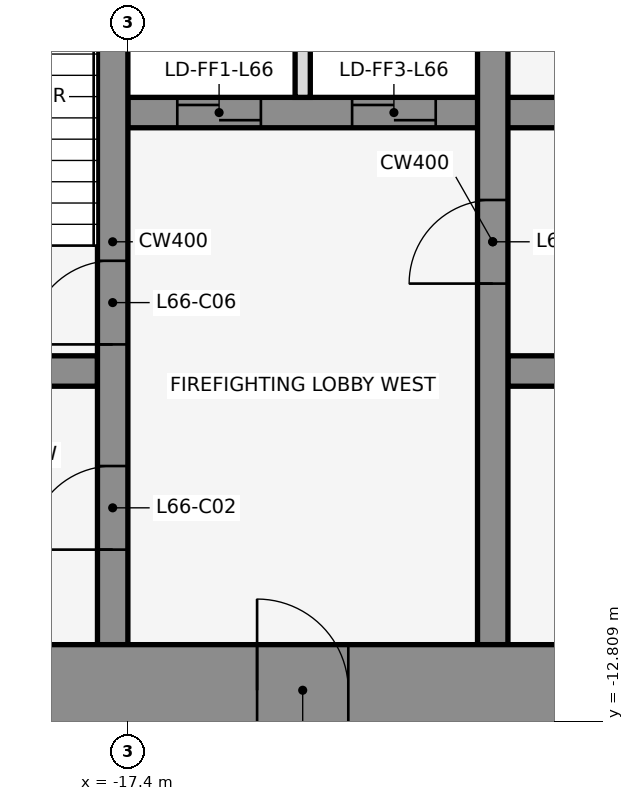
"""IFC4 building model, lengths in metres.
Left out: names, types, materials, properties, quantities, classifications, styles, units other than length and angle.
Written with IfcOpenShell. Run it as: python <this file> out.ifc"""

import sys

from ifc_helpers import new_model, si_unit, direction, frame, frame_2d, origin, place, context, subcontext, project, spatial, rectangle, extrude, element, fill, save


model = new_model("IFC4")
c1 = context("Model", 3, precision=1e-05, world=origin(), true_north=direction((0.0, 1.0)))
c2 = subcontext(c1, "Body", "Model", "MODEL_VIEW")
j1 = project(units=[si_unit("LENGTHUNIT", "METRE"), si_unit("PLANEANGLEUNIT", "RADIAN")], contexts=[c1])
p1 = place(None, origin())
s1 = spatial("IfcSite", under=j1, at=p1, CompositionType="ELEMENT")
p2 = place(p1, origin())
s2 = spatial("IfcBuilding", under=s1, at=p2, CompositionType="ELEMENT")
p3 = place(p2, frame((0.0, 0.0, 293.0)))
s3 = spatial("IfcBuildingStorey", under=s2, at=p3, CompositionType="ELEMENT", Elevation=293.0)
p4 = place(p3, frame((-20.8, -8.2, 0.0), z_axis=(0.0, 0.0, 1.0), x_axis=(1.0, 0.0, 0.0)))
e1 = element("IfcWall", 1, at=p4, inside=s3, PredefinedType="SHEAR", context=c2, shape_type="SweptSolid", body=[
    extrude(rectangle(XDim=3.0, YDim=0.4, at=frame_2d((1.5, 0.0))), origin(), (0.0, 0.0, 1.0), 4.5),
])
p5 = place(p4, frame((0.85, 0.0, 0.0)))
e2 = element("IfcOpeningElement", 2, at=p5, cuts=e1, PredefinedType="OPENING", context=c2, shape_type="SweptSolid", body=[
    extrude(rectangle(XDim=1.2, YDim=2.1, at=frame_2d((0.6, 1.05))), frame((0.0, 0.212, 0.0), z_axis=(0.0, -1.0, 0.0), x_axis=(1.0, 0.0, 0.0)), (0.0, 0.0, 1.0), 0.424),
])
p6 = place(p3, frame((-12.4, -8.2, 0.0), z_axis=(0.0, 0.0, 1.0), x_axis=(1.0, 0.0, 0.0)))
e3 = element("IfcWall", 3, at=p6, inside=s3, PredefinedType="SHEAR", context=c2, shape_type="SweptSolid", body=[
    extrude(rectangle(XDim=6.0, YDim=0.4, at=frame_2d((3.0, 0.0))), origin(), (0.0, 0.0, 1.0), 4.5),
])
p7 = place(p3, frame((-17.4, -4.8, 0.0), z_axis=(0.0, 0.0, 1.0), x_axis=(1.0, 0.0, 0.0)))
e4 = element("IfcWall", 4, at=p7, inside=s3, PredefinedType="SHEAR", context=c2, shape_type="SweptSolid", body=[
    extrude(rectangle(XDim=13.6, YDim=0.4, at=frame_2d((6.8, 0.0))), origin(), (0.0, 0.0, 1.0), 4.5),
])
p8 = place(p7, frame((0.65, 0.0, 0.0)))
e5 = element("IfcOpeningElement", 5, at=p8, cuts=e4, PredefinedType="OPENING", context=c2, shape_type="SweptSolid", body=[
    extrude(rectangle(XDim=1.1, YDim=2.1, at=frame_2d((0.55, 1.05))), frame((0.0, 0.212, 0.0), z_axis=(0.0, -1.0, 0.0), x_axis=(1.0, 0.0, 0.0)), (0.0, 0.0, 1.0), 0.424),
])
p9 = place(p7, frame((2.95, 0.0, 0.0)))
e6 = element("IfcOpeningElement", 6, at=p9, cuts=e4, PredefinedType="OPENING", context=c2, shape_type="SweptSolid", body=[
    extrude(rectangle(XDim=1.1, YDim=2.1, at=frame_2d((0.55, 1.05))), frame((0.0, 0.212, 0.0), z_axis=(0.0, -1.0, 0.0), x_axis=(1.0, 0.0, 0.0)), (0.0, 0.0, 1.0), 0.424),
])
p10 = place(p7, frame((5.85, 0.0, 0.0)))
e7 = element("IfcOpeningElement", 7, at=p10, cuts=e4, PredefinedType="OPENING", context=c2, shape_type="SweptSolid", body=[
    extrude(rectangle(XDim=0.9, YDim=2.1, at=frame_2d((0.45, 1.05))), frame((0.0, 0.212, 0.0), z_axis=(0.0, -1.0, 0.0), x_axis=(1.0, 0.0, 0.0)), (0.0, 0.0, 1.0), 0.424),
])
p11 = place(p7, frame((10.25, 0.0, 0.0)))
e8 = element("IfcOpeningElement", 8, at=p11, cuts=e4, PredefinedType="OPENING", context=c2, shape_type="SweptSolid", body=[
    extrude(rectangle(XDim=0.9, YDim=2.1, at=frame_2d((0.45, 1.05))), frame((0.0, 0.212, 0.0), z_axis=(0.0, -1.0, 0.0), x_axis=(1.0, 0.0, 0.0)), (0.0, 0.0, 1.0), 0.424),
])
p12 = place(p3, frame((-17.6, -11.8, 0.0), z_axis=(0.0, 0.0, 1.0), x_axis=(0.0, 1.0, 0.0)))
e9 = element("IfcWall", 9, at=p12, inside=s3, PredefinedType="SHEAR", context=c2, shape_type="SweptSolid", body=[
    extrude(rectangle(XDim=10.6, YDim=0.4, at=frame_2d((5.3, 0.0))), origin(), (0.0, 0.0, 1.0), 4.5),
])
p13 = place(p12, frame((1.25, 0.0, 0.0)))
e10 = element("IfcOpeningElement", 10, at=p13, cuts=e9, PredefinedType="OPENING", context=c2, shape_type="SweptSolid", body=[
    extrude(rectangle(XDim=1.1, YDim=2.1, at=frame_2d((0.55, 1.05))), frame((0.0, 0.212, 0.0), z_axis=(0.0, -1.0, 0.0), x_axis=(1.0, 0.0, 0.0)), (0.0, 0.0, 1.0), 0.424),
])
p14 = place(p12, frame((3.95, 0.0, 0.0)))
e11 = element("IfcOpeningElement", 11, at=p14, cuts=e9, PredefinedType="OPENING", context=c2, shape_type="SweptSolid", body=[
    extrude(rectangle(XDim=1.1, YDim=2.1, at=frame_2d((0.55, 1.05))), frame((0.0, 0.212, 0.0), z_axis=(0.0, -1.0, 0.0), x_axis=(1.0, 0.0, 0.0)), (0.0, 0.0, 1.0), 0.424),
])
p15 = place(p3, frame((-15.1, -4.6, 0.0), z_axis=(0.0, 0.0, 1.0), x_axis=(0.0, 1.0, 0.0)))
e12 = element("IfcWall", 12, at=p15, inside=s3, PredefinedType="PARTITIONING", context=c2, shape_type="SweptSolid", body=[
    extrude(rectangle(XDim=3.4, YDim=0.2, at=frame_2d((1.7, 0.0))), origin(), (0.0, 0.0, 1.0), 3.418),
])
p16 = place(p3, frame((-12.6, -11.8, 0.0), z_axis=(0.0, 0.0, 1.0), x_axis=(0.0, 1.0, 0.0)))
e13 = element("IfcWall", 13, at=p16, inside=s3, PredefinedType="SHEAR", context=c2, shape_type="SweptSolid", body=[
    extrude(rectangle(XDim=10.6, YDim=0.4, at=frame_2d((5.3, 0.0))), origin(), (0.0, 0.0, 1.0), 4.5),
])
p17 = place(p16, frame((4.75, 0.0, 0.0)))
e14 = element("IfcOpeningElement", 14, at=p17, cuts=e13, PredefinedType="OPENING", context=c2, shape_type="SweptSolid", body=[
    extrude(rectangle(XDim=1.1, YDim=2.1, at=frame_2d((0.55, 1.05))), frame((0.0, 0.212, 0.0), z_axis=(0.0, -1.0, 0.0), x_axis=(1.0, 0.0, 0.0)), (0.0, 0.0, 1.0), 0.424),
])
p18 = place(p3, frame((-22.0, -12.4, 0.0), z_axis=(0.0, 0.0, 1.0), x_axis=(1.0, 0.0, 0.0)))
e15 = element("IfcWall", 15, at=p18, inside=s3, PredefinedType="SHEAR", context=c2, shape_type="SweptSolid", body=[
    extrude(rectangle(XDim=44.0, YDim=1.2, at=frame_2d((22.0, 0.0))), origin(), (0.0, 0.0, 1.0), 4.5),
])
p19 = place(p18, frame((2.2, 0.0, 0.0)))
e16 = element("IfcOpeningElement", 16, at=p19, cuts=e15, PredefinedType="OPENING", context=c2, shape_type="SweptSolid", body=[
    extrude(rectangle(XDim=1.2, YDim=2.1, at=frame_2d((0.6, 1.05))), frame((0.0, 0.612, 0.0), z_axis=(0.0, -1.0, 0.0), x_axis=(1.0, 0.0, 0.0)), (0.0, 0.0, 1.0), 1.224),
])
p20 = place(p18, frame((21.4, 0.0, 0.0)))
e17 = element("IfcOpeningElement", 17, at=p20, cuts=e15, PredefinedType="OPENING", context=c2, shape_type="SweptSolid", body=[
    extrude(rectangle(XDim=1.2, YDim=2.1, at=frame_2d((0.6, 1.05))), frame((0.0, 0.612, 0.0), z_axis=(0.0, -1.0, 0.0), x_axis=(1.0, 0.0, 0.0)), (0.0, 0.0, 1.0), 1.224),
])
p21 = place(p18, frame((40.6, 0.0, 0.0)))
e18 = element("IfcOpeningElement", 18, at=p21, cuts=e15, PredefinedType="OPENING", context=c2, shape_type="SweptSolid", body=[
    extrude(rectangle(XDim=1.2, YDim=2.1, at=frame_2d((0.6, 1.05))), frame((0.0, 0.612, 0.0), z_axis=(0.0, -1.0, 0.0), x_axis=(1.0, 0.0, 0.0)), (0.0, 0.0, 1.0), 1.224),
])
p22 = place(p18, frame((16.0, 0.0, 0.0)))
e19 = element("IfcOpeningElement", 19, at=p22, cuts=e15, PredefinedType="OPENING", context=c2, shape_type="SweptSolid", body=[
    extrude(rectangle(XDim=1.8, YDim=2.1, at=frame_2d((0.9, 1.05))), frame((0.0, 0.612, 0.0), z_axis=(0.0, -1.0, 0.0), x_axis=(1.0, 0.0, 0.0)), (0.0, 0.0, 1.0), 1.224),
])
p23 = place(p18, frame((6.3, 0.0, 0.0)))
e20 = element("IfcOpeningElement", 20, at=p23, cuts=e15, PredefinedType="OPENING", context=c2, shape_type="SweptSolid", body=[
    extrude(rectangle(XDim=1.2, YDim=2.1, at=frame_2d((0.6, 1.05))), frame((0.0, 0.612, 0.0), z_axis=(0.0, -1.0, 0.0), x_axis=(1.0, 0.0, 0.0)), (0.0, 0.0, 1.0), 1.224),
])
p24 = place(p18, frame((26.2, 0.0, 0.0)))
e21 = element("IfcOpeningElement", 21, at=p24, cuts=e15, PredefinedType="OPENING", context=c2, shape_type="SweptSolid", body=[
    extrude(rectangle(XDim=1.8, YDim=2.1, at=frame_2d((0.9, 1.05))), frame((0.0, 0.612, 0.0), z_axis=(0.0, -1.0, 0.0), x_axis=(1.0, 0.0, 0.0)), (0.0, 0.0, 1.0), 1.224),
])
p25 = place(p18, frame((36.5, 0.0, 0.0)))
e22 = element("IfcOpeningElement", 22, at=p25, cuts=e15, PredefinedType="OPENING", context=c2, shape_type="SweptSolid", body=[
    extrude(rectangle(XDim=1.2, YDim=2.1, at=frame_2d((0.6, 1.05))), frame((0.0, 0.612, 0.0), z_axis=(0.0, -1.0, 0.0), x_axis=(1.0, 0.0, 0.0)), (0.0, 0.0, 1.0), 1.224),
])
p26 = place(p13, frame((1.1, 0.0, 0.0), z_axis=(0.0, 0.0, 1.0), x_axis=(-1.0, 0.0, 0.0)))
e23 = element("IfcDoor", 23, at=p26, inside=s3, OperationType="SINGLE_SWING_LEFT", PredefinedType="DOOR", context=c2, shape_type="SweptSolid", body=[
    extrude(rectangle(XDim=1.1, YDim=2.1, at=frame_2d((0.55, 1.05))), frame((0.0, 0.025, 0.0), z_axis=(0.0, -1.0, 0.0), x_axis=(1.0, 0.0, 0.0)), (0.0, 0.0, 1.0), 0.05),
])
fill(e10, e23)
p27 = place(p8, origin())
e24 = element("IfcDoor", 24, at=p27, inside=s3, OperationType="DOUBLE_DOOR_SLIDING", PredefinedType="DOOR", context=c2, shape_type="SweptSolid", body=[
    extrude(rectangle(XDim=1.1, YDim=2.1, at=frame_2d((0.55, 1.05))), frame((0.0, 0.025, 0.0), z_axis=(0.0, -1.0, 0.0), x_axis=(1.0, 0.0, 0.0)), (0.0, 0.0, 1.0), 0.05),
])
fill(e5, e24)
p28 = place(p9, origin())
e25 = element("IfcDoor", 25, at=p28, inside=s3, OperationType="DOUBLE_DOOR_SLIDING", PredefinedType="DOOR", context=c2, shape_type="SweptSolid", body=[
    extrude(rectangle(XDim=1.1, YDim=2.1, at=frame_2d((0.55, 1.05))), frame((0.0, 0.025, 0.0), z_axis=(0.0, -1.0, 0.0), x_axis=(1.0, 0.0, 0.0)), (0.0, 0.0, 1.0), 0.05),
])
fill(e6, e25)
p29 = place(p14, frame((1.1, 0.0, 0.0), z_axis=(0.0, 0.0, 1.0), x_axis=(-1.0, 0.0, 0.0)))
e26 = element("IfcDoor", 26, at=p29, inside=s3, OperationType="SINGLE_SWING_LEFT", PredefinedType="DOOR", context=c2, shape_type="SweptSolid", body=[
    extrude(rectangle(XDim=1.1, YDim=2.1, at=frame_2d((0.55, 1.05))), frame((0.0, 0.025, 0.0), z_axis=(0.0, -1.0, 0.0), x_axis=(1.0, 0.0, 0.0)), (0.0, 0.0, 1.0), 0.05),
])
fill(e11, e26)
p30 = place(p17, origin())
e27 = element("IfcDoor", 27, at=p30, inside=s3, OperationType="SINGLE_SWING_LEFT", PredefinedType="DOOR", context=c2, shape_type="SweptSolid", body=[
    extrude(rectangle(XDim=1.1, YDim=2.1, at=frame_2d((0.55, 1.05))), frame((0.0, 0.025, 0.0), z_axis=(0.0, -1.0, 0.0), x_axis=(1.0, 0.0, 0.0)), (0.0, 0.0, 1.0), 0.05),
])
fill(e14, e27)
p31 = place(p23, frame((1.2, 0.0, 0.0), z_axis=(0.0, 0.0, 1.0), x_axis=(-1.0, 0.0, 0.0)))
e28 = element("IfcDoor", 28, at=p31, inside=s3, OperationType="SINGLE_SWING_RIGHT", PredefinedType="DOOR", context=c2, shape_type="SweptSolid", body=[
    extrude(rectangle(XDim=1.2, YDim=2.1, at=frame_2d((0.6, 1.05))), frame((0.0, 0.025, 0.0), z_axis=(0.0, -1.0, 0.0), x_axis=(1.0, 0.0, 0.0)), (0.0, 0.0, 1.0), 0.05),
])
fill(e20, e28)
save(model, sys.argv[1])
